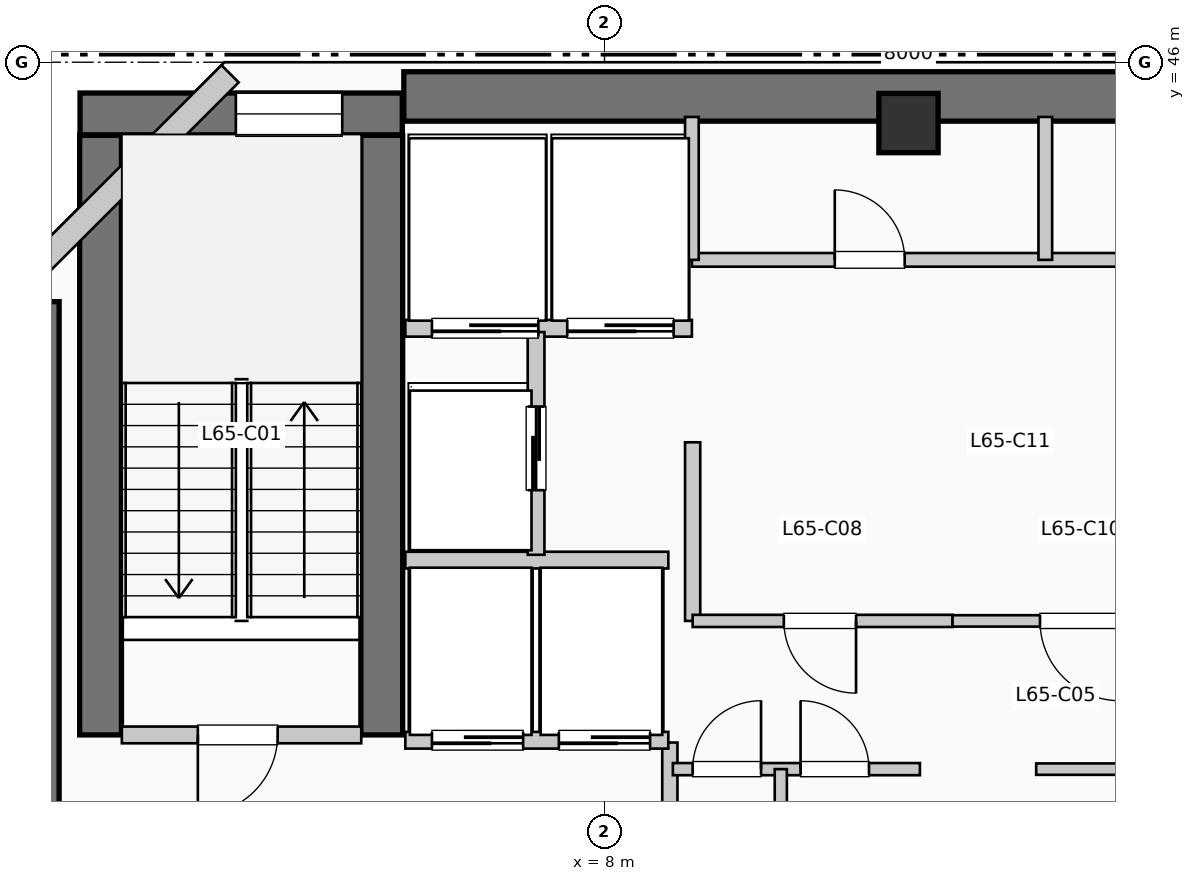
"""IFC4 building model, lengths in metres.
Left out: names, types, materials, properties, quantities, classifications, styles, units other than length and angle.
Written with IfcOpenShell. Run it as: python <this file> out.ifc"""

import sys

from ifc_helpers import new_model, si_unit, direction, frame, frame_2d, origin, origin_2d, place, context, subcontext, project, spatial, rectangle, extrude, element, fill, save


model = new_model("IFC4")
c1 = context("Model", 3, precision=1e-05, world=origin(), true_north=direction((0.0, 1.0)))
c2 = subcontext(c1, "Body", "Model", "MODEL_VIEW")
j1 = project(units=[si_unit("LENGTHUNIT", "METRE"), si_unit("PLANEANGLEUNIT", "RADIAN")], contexts=[c1])
p1 = place(None, origin())
s1 = spatial("IfcSite", under=j1, at=p1, CompositionType="ELEMENT")
p2 = place(p1, origin())
s2 = spatial("IfcBuilding", under=s1, at=p2, CompositionType="ELEMENT")
p3 = place(p2, frame((0.0, 0.0, 268.29)))
s3 = spatial("IfcBuildingStorey", under=s2, at=p3, CompositionType="ELEMENT", Elevation=268.29)
p4 = place(p3, frame((5.36, 45.55, 0.0), z_axis=(0.0, 0.0, 1.0), x_axis=(1.0, 0.0, 0.0)))
e1 = element("IfcWall", 1, at=p4, inside=s3, PredefinedType="SHEAR", context=c2, shape_type="SweptSolid", body=[
    extrude(rectangle(XDim=13.98, YDim=0.65, at=frame_2d((6.99, 0.0))), origin(), (0.0, 0.0, 1.0), 3.96),
])
p5 = place(p3, frame((0.5, 34.95, 0.0), z_axis=(0.0, 0.0, 1.0), x_axis=(0.0, 1.0, 0.0)))
e2 = element("IfcWall", 2, at=p5, inside=s3, PredefinedType="SHEAR", context=c2, shape_type="SweptSolid", body=[
    extrude(rectangle(XDim=7.9, YDim=0.65, at=frame_2d((3.95, 0.0))), origin(), (0.0, 0.0, 1.0), 3.96),
])
for number, where, z_axis, x_axis in (
    (3, (1.37, 37.15, 0.0), (0.0, 0.0, 1.0), (0.0, 1.0, 0.0)),
    (4, (5.07, 37.15, 0.0), (0.0, 0.0, 1.0), (0.0, 1.0, 0.0)),
):
    element("IfcWall", number, at=place(p3, frame(where, z_axis=z_axis, x_axis=x_axis)), inside=s3, PredefinedType="SHEAR", context=c2, shape_type="SweptSolid", body=[
        extrude(rectangle(XDim=7.89, YDim=0.55, at=frame_2d((3.945, 0.0))), origin(), (0.0, 0.0, 1.0), 3.96),
    ])
p6 = place(p3, frame((1.1, 45.32, 0.0), z_axis=(0.0, 0.0, 1.0), x_axis=(1.0, 0.0, 0.0)))
e5 = element("IfcWall", 5, at=p6, inside=s3, PredefinedType="SHEAR", context=c2, shape_type="SweptSolid", body=[
    extrude(rectangle(XDim=4.24, YDim=0.55, at=frame_2d((2.12, 0.0))), origin(), (0.0, 0.0, 1.0), 3.96),
])
p7 = place(p6, frame((2.05, 0.0, 1.05)))
e6 = element("IfcOpeningElement", 6, at=p7, cuts=e5, PredefinedType="OPENING", context=c2, shape_type="SweptSolid", body=[
    extrude(rectangle(XDim=1.4, YDim=1.8, at=frame_2d((0.7, 0.9))), frame((0.0, 0.285, 0.0), z_axis=(0.0, -1.0, 0.0), x_axis=(1.0, 0.0, 0.0)), (0.0, 0.0, 1.0), 0.57),
])
p8 = place(p3, frame((12.0, 45.2, 0.0), z_axis=(0.0, 0.0, 1.0), x_axis=(1.0, 0.0, 0.0)))
e7 = element("IfcColumn", 7, at=p8, inside=s3, PredefinedType="COLUMN", context=c2, shape_type="SweptSolid", body=[
    extrude(rectangle(XDim=0.78, YDim=0.78, at=origin_2d()), origin(), (0.0, 0.0, 1.0), 3.96),
])
p9 = place(p3, frame((3.074, 45.848, 0.0), z_axis=(0.0, 0.0, 1.0), x_axis=(-0.707106781187, -0.707106781187, 0.0)))
e8 = element("IfcWall", 8, at=p9, inside=s3, PredefinedType="SOLIDWALL", context=c2, shape_type="SweptSolid", body=[
    extrude(rectangle(XDim=4.133, YDim=0.32, at=frame_2d((2.066, 0.0))), origin(), (0.0, 0.0, 1.0), 3.74),
])
p10 = place(p3, frame((1.65, 37.15, 0.0), z_axis=(0.0, 0.0, 1.0), x_axis=(1.0, 0.0, 0.0)))
e9 = element("IfcWall", 9, at=p10, inside=s3, PredefinedType="PARTITIONING", context=c2, shape_type="SweptSolid", body=[
    extrude(rectangle(XDim=3.15, YDim=0.22, at=frame_2d((1.575, 0.0))), origin(), (0.0, 0.0, 1.0), 3.74),
])
p11 = place(p10, frame((2.05, 0.0, 0.0), z_axis=(0.0, 0.0, 1.0), x_axis=(-1.0, 0.0, 0.0)))
e10 = element("IfcOpeningElement", 10, at=p11, cuts=e9, PredefinedType="OPENING", context=c2, shape_type="SweptSolid", body=[
    extrude(rectangle(XDim=1.05, YDim=2.15, at=frame_2d((0.525, 1.075))), frame((0.0, 0.12, 0.0), z_axis=(0.0, -1.0, 0.0), x_axis=(1.0, 0.0, 0.0)), (0.0, 0.0, 1.0), 0.24),
])
p12 = place(p3, frame((8.86, 34.55, 0.0), z_axis=(0.0, 0.0, 1.0), x_axis=(0.0, 1.0, 0.0)))
e11 = element("IfcWall", 11, at=p12, inside=s3, PredefinedType="PARTITIONING", context=c2, shape_type="SweptSolid", body=[
    extrude(rectangle(XDim=2.5, YDim=0.2, at=frame_2d((1.25, 0.0))), origin(), (0.0, 0.0, 1.0), 3.74),
])
p13 = place(p3, frame((5.38, 37.08, 0.0), z_axis=(0.0, 0.0, 1.0), x_axis=(1.0, 0.0, 0.0)))
e12 = element("IfcWall", 12, at=p13, inside=s3, PredefinedType="PARTITIONING", context=c2, shape_type="SweptSolid", body=[
    extrude(rectangle(XDim=3.46, YDim=0.22, at=frame_2d((1.73, 0.0))), origin(), (0.0, 0.0, 1.0), 3.74),
])
p14 = place(p13, frame((1.55, 0.0, 0.0), z_axis=(0.0, 0.0, 1.0), x_axis=(-1.0, 0.0, 0.0)))
e13 = element("IfcOpeningElement", 13, at=p14, cuts=e12, PredefinedType="OPENING", context=c2, shape_type="SweptSolid", body=[
    extrude(rectangle(XDim=1.2, YDim=2.2, at=frame_2d((0.6, 1.1))), frame((0.0, 0.12, 0.0), z_axis=(0.0, -1.0, 0.0), x_axis=(1.0, 0.0, 0.0)), (0.0, 0.0, 1.0), 0.24),
])
p15 = place(p13, frame((3.22, 0.0, 0.0), z_axis=(0.0, 0.0, 1.0), x_axis=(-1.0, 0.0, 0.0)))
e14 = element("IfcOpeningElement", 14, at=p15, cuts=e12, PredefinedType="OPENING", context=c2, shape_type="SweptSolid", body=[
    extrude(rectangle(XDim=1.2, YDim=2.2, at=frame_2d((0.6, 1.1))), frame((0.0, 0.12, 0.0), z_axis=(0.0, -1.0, 0.0), x_axis=(1.0, 0.0, 0.0)), (0.0, 0.0, 1.0), 0.24),
])
p16 = place(p3, frame((5.38, 39.45, 0.0), z_axis=(0.0, 0.0, 1.0), x_axis=(1.0, 0.0, 0.0)))
e15 = element("IfcWall", 15, at=p16, inside=s3, PredefinedType="PARTITIONING", context=c2, shape_type="SweptSolid", body=[
    extrude(rectangle(XDim=3.46, YDim=0.22, at=frame_2d((1.73, 0.0))), origin(), (0.0, 0.0, 1.0), 3.74),
])
p17 = place(p3, frame((5.38, 42.5, 0.0), z_axis=(0.0, 0.0, 1.0), x_axis=(1.0, 0.0, 0.0)))
e16 = element("IfcWall", 16, at=p17, inside=s3, PredefinedType="PARTITIONING", context=c2, shape_type="SweptSolid", body=[
    extrude(rectangle(XDim=3.77, YDim=0.22, at=frame_2d((1.885, 0.0))), origin(), (0.0, 0.0, 1.0), 3.74),
])
p18 = place(p17, frame((1.75, 0.0, 0.0), z_axis=(0.0, 0.0, 1.0), x_axis=(-1.0, 0.0, 0.0)))
e17 = element("IfcOpeningElement", 17, at=p18, cuts=e16, PredefinedType="OPENING", context=c2, shape_type="SweptSolid", body=[
    extrude(rectangle(XDim=1.4, YDim=2.2, at=frame_2d((0.7, 1.1))), frame((0.0, 0.12, 0.0), z_axis=(0.0, -1.0, 0.0), x_axis=(1.0, 0.0, 0.0)), (0.0, 0.0, 1.0), 0.24),
])
p19 = place(p17, frame((3.53, 0.0, 0.0), z_axis=(0.0, 0.0, 1.0), x_axis=(-1.0, 0.0, 0.0)))
e18 = element("IfcOpeningElement", 18, at=p19, cuts=e16, PredefinedType="OPENING", context=c2, shape_type="SweptSolid", body=[
    extrude(rectangle(XDim=1.4, YDim=2.2, at=frame_2d((0.7, 1.1))), frame((0.0, 0.12, 0.0), z_axis=(0.0, -1.0, 0.0), x_axis=(1.0, 0.0, 0.0)), (0.0, 0.0, 1.0), 0.24),
])
p20 = place(p3, frame((7.1, 39.52, 0.0), z_axis=(0.0, 0.0, 1.0), x_axis=(0.0, 1.0, 0.0)))
e19 = element("IfcWall", 19, at=p20, inside=s3, PredefinedType="PARTITIONING", context=c2, shape_type="SweptSolid", body=[
    extrude(rectangle(XDim=2.93, YDim=0.22, at=frame_2d((1.465, 0.0))), origin(), (0.0, 0.0, 1.0), 3.74),
])
p21 = place(p20, frame((0.85, 0.0, 0.0)))
e20 = element("IfcOpeningElement", 20, at=p21, cuts=e19, PredefinedType="OPENING", context=c2, shape_type="SweptSolid", body=[
    extrude(rectangle(XDim=1.1, YDim=2.2, at=frame_2d((0.55, 1.1))), frame((0.0, 0.12, 0.0), z_axis=(0.0, -1.0, 0.0), x_axis=(1.0, 0.0, 0.0)), (0.0, 0.0, 1.0), 0.24),
])
p22 = place(p3, frame((9.16, 38.65, 0.0), z_axis=(0.0, 0.0, 1.0), x_axis=(0.0, 1.0, 0.0)))
e21 = element("IfcWall", 21, at=p22, inside=s3, PredefinedType="PARTITIONING", context=c2, shape_type="SweptSolid", body=[
    extrude(rectangle(XDim=2.35, YDim=0.2, at=frame_2d((1.175, 0.0))), origin(), (0.0, 0.0, 1.0), 3.74),
])
p23 = place(p3, frame((8.9, 36.7, 0.0), z_axis=(0.0, 0.0, 1.0), x_axis=(1.0, 0.0, 0.0)))
e22 = element("IfcWall", 22, at=p23, inside=s3, PredefinedType="PARTITIONING", context=c2, shape_type="SweptSolid", body=[
    extrude(rectangle(XDim=3.25, YDim=0.16, at=frame_2d((1.625, 0.0))), origin(), (0.0, 0.0, 1.0), 3.74),
])
p24 = place(p23, frame((0.26, 0.0, 0.0)))
e23 = element("IfcOpeningElement", 23, at=p24, cuts=e22, PredefinedType="OPENING", context=c2, shape_type="SweptSolid", body=[
    extrude(rectangle(XDim=0.9, YDim=2.15, at=frame_2d((0.45, 1.075))), frame((0.0, 0.09, 0.0), z_axis=(0.0, -1.0, 0.0), x_axis=(1.0, 0.0, 0.0)), (0.0, 0.0, 1.0), 0.18),
])
p25 = place(p23, frame((1.68, 0.0, 0.0)))
e24 = element("IfcOpeningElement", 24, at=p25, cuts=e22, PredefinedType="OPENING", context=c2, shape_type="SweptSolid", body=[
    extrude(rectangle(XDim=0.9, YDim=2.15, at=frame_2d((0.45, 1.075))), frame((0.0, 0.09, 0.0), z_axis=(0.0, -1.0, 0.0), x_axis=(1.0, 0.0, 0.0)), (0.0, 0.0, 1.0), 0.18),
])
p26 = place(p3, frame((10.32, 34.55, 0.0), z_axis=(0.0, 0.0, 1.0), x_axis=(0.0, 1.0, 0.0)))
e25 = element("IfcWall", 25, at=p26, inside=s3, PredefinedType="PARTITIONING", context=c2, shape_type="SweptSolid", body=[
    extrude(rectangle(XDim=2.15, YDim=0.16, at=frame_2d((1.075, 0.0))), origin(), (0.0, 0.0, 1.0), 3.74),
])
p27 = place(p3, frame((9.16, 38.65, 0.0), z_axis=(0.0, 0.0, 1.0), x_axis=(1.0, 0.0, 0.0)))
e26 = element("IfcWall", 26, at=p27, inside=s3, PredefinedType="PARTITIONING", context=c2, shape_type="SweptSolid", body=[
    extrude(rectangle(XDim=3.42, YDim=0.16, at=frame_2d((1.71, 0.0))), origin(), (0.0, 0.0, 1.0), 3.74),
])
p28 = place(p27, frame((2.15, 0.0, 0.0), z_axis=(0.0, 0.0, 1.0), x_axis=(-1.0, 0.0, 0.0)))
e27 = element("IfcOpeningElement", 27, at=p28, cuts=e26, PredefinedType="OPENING", context=c2, shape_type="SweptSolid", body=[
    extrude(rectangle(XDim=0.95, YDim=2.15, at=frame_2d((0.475, 1.075))), frame((0.0, 0.09, 0.0), z_axis=(0.0, -1.0, 0.0), x_axis=(1.0, 0.0, 0.0)), (0.0, 0.0, 1.0), 0.18),
])
p29 = place(p3, frame((13.68, 36.7, 0.0), z_axis=(0.0, 0.0, 1.0), x_axis=(1.0, 0.0, 0.0)))
e28 = element("IfcWall", 28, at=p29, inside=s3, PredefinedType="PARTITIONING", context=c2, shape_type="SweptSolid", body=[
    extrude(rectangle(XDim=3.28, YDim=0.15, at=frame_2d((1.64, 0.0))), origin(), (0.0, 0.0, 1.0), 3.74),
])
p30 = place(p29, frame((1.15, 0.0, 0.0)))
e29 = element("IfcOpeningElement", 29, at=p30, cuts=e28, PredefinedType="OPENING", context=c2, shape_type="SweptSolid", body=[
    extrude(rectangle(XDim=0.95, YDim=2.15, at=frame_2d((0.475, 1.075))), frame((0.0, 0.085, 0.0), z_axis=(0.0, -1.0, 0.0), x_axis=(1.0, 0.0, 0.0)), (0.0, 0.0, 1.0), 0.17),
])
p31 = place(p3, frame((12.58, 38.65, 0.0), z_axis=(0.0, 0.0, 1.0), x_axis=(1.0, 0.0, 0.0)))
e30 = element("IfcWall", 30, at=p31, inside=s3, PredefinedType="PARTITIONING", context=c2, shape_type="SweptSolid", body=[
    extrude(rectangle(XDim=3.38, YDim=0.15, at=frame_2d((1.69, 0.0))), origin(), (0.0, 0.0, 1.0), 3.74),
])
p32 = place(p31, frame((2.2, 0.0, 0.0), z_axis=(0.0, 0.0, 1.0), x_axis=(-1.0, 0.0, 0.0)))
e31 = element("IfcOpeningElement", 31, at=p32, cuts=e30, PredefinedType="OPENING", context=c2, shape_type="SweptSolid", body=[
    extrude(rectangle(XDim=1.05, YDim=2.15, at=frame_2d((0.525, 1.075))), frame((0.0, 0.085, 0.0), z_axis=(0.0, -1.0, 0.0), x_axis=(1.0, 0.0, 0.0)), (0.0, 0.0, 1.0), 0.17),
])
p33 = place(p3, frame((9.15, 43.4, 0.0), z_axis=(0.0, 0.0, 1.0), x_axis=(1.0, 0.0, 0.0)))
e32 = element("IfcWall", 32, at=p33, inside=s3, PredefinedType="PLUMBINGWALL", context=c2, shape_type="SweptSolid", body=[
    extrude(rectangle(XDim=9.33, YDim=0.18, at=frame_2d((4.665, 0.0))), origin(), (0.0, 0.0, 1.0), 3.74),
])
p34 = place(p33, frame((1.88, 0.0, 0.0)))
e33 = element("IfcOpeningElement", 33, at=p34, cuts=e32, PredefinedType="OPENING", context=c2, shape_type="SweptSolid", body=[
    extrude(rectangle(XDim=0.92, YDim=2.1, at=frame_2d((0.46, 1.05))), frame((0.0, 0.1, 0.0), z_axis=(0.0, -1.0, 0.0), x_axis=(1.0, 0.0, 0.0)), (0.0, 0.0, 1.0), 0.2),
])
p35 = place(p33, frame((6.515, 0.0, 0.0)))
e34 = element("IfcOpeningElement", 34, at=p35, cuts=e32, PredefinedType="OPENING", context=c2, shape_type="SweptSolid", body=[
    extrude(rectangle(XDim=0.92, YDim=2.1, at=frame_2d((0.46, 1.05))), frame((0.0, 0.1, 0.0), z_axis=(0.0, -1.0, 0.0), x_axis=(1.0, 0.0, 0.0)), (0.0, 0.0, 1.0), 0.2),
])
for number, where, z_axis, x_axis in (
    (35, (9.15, 43.4, 0.0), (0.0, 0.0, 1.0), (0.0, 1.0, 0.0)),
    (36, (13.8, 43.4, 0.0), (0.0, 0.0, 1.0), (0.0, 1.0, 0.0)),
):
    element("IfcWall", number, at=place(p3, frame(where, z_axis=z_axis, x_axis=x_axis)), inside=s3, PredefinedType="PLUMBINGWALL", context=c2, shape_type="SweptSolid", body=[
        extrude(rectangle(XDim=1.88, YDim=0.18, at=frame_2d((0.94, 0.0))), origin(), (0.0, 0.0, 1.0), 3.74),
    ])
p36 = place(p7, origin())
e37 = element("IfcWindow", 37, at=p36, inside=s3, PartitioningType="SINGLE_PANEL", PredefinedType="WINDOW", context=c2, shape_type="SweptSolid", body=[
    extrude(rectangle(XDim=1.4, YDim=1.8, at=frame_2d((0.7, 0.9))), frame((0.0, 0.03, 0.0), z_axis=(0.0, -1.0, 0.0), x_axis=(1.0, 0.0, 0.0)), (0.0, 0.0, 1.0), 0.06),
])
fill(e6, e37)
p37 = place(p11, origin())
e38 = element("IfcDoor", 38, at=p37, inside=s3, OperationType="SINGLE_SWING_LEFT", PredefinedType="DOOR", context=c2, shape_type="SweptSolid", body=[
    extrude(rectangle(XDim=1.05, YDim=2.15, at=frame_2d((0.525, 1.075))), frame((0.0, 0.025, 0.0), z_axis=(0.0, -1.0, 0.0), x_axis=(1.0, 0.0, 0.0)), (0.0, 0.0, 1.0), 0.05),
])
fill(e10, e38)
p38 = place(p14, origin())
e39 = element("IfcDoor", 39, at=p38, inside=s3, OperationType="SLIDING_TO_RIGHT", PredefinedType="DOOR", context=c2, shape_type="SweptSolid", body=[
    extrude(rectangle(XDim=1.2, YDim=2.2, at=frame_2d((0.6, 1.1))), frame((0.0, 0.025, 0.0), z_axis=(0.0, -1.0, 0.0), x_axis=(1.0, 0.0, 0.0)), (0.0, 0.0, 1.0), 0.05),
])
fill(e13, e39)
p39 = place(p15, origin())
e40 = element("IfcDoor", 40, at=p39, inside=s3, OperationType="SLIDING_TO_RIGHT", PredefinedType="DOOR", context=c2, shape_type="SweptSolid", body=[
    extrude(rectangle(XDim=1.2, YDim=2.2, at=frame_2d((0.6, 1.1))), frame((0.0, 0.025, 0.0), z_axis=(0.0, -1.0, 0.0), x_axis=(1.0, 0.0, 0.0)), (0.0, 0.0, 1.0), 0.05),
])
fill(e14, e40)
p40 = place(p18, origin())
e41 = element("IfcDoor", 41, at=p40, inside=s3, OperationType="SLIDING_TO_LEFT", PredefinedType="DOOR", context=c2, shape_type="SweptSolid", body=[
    extrude(rectangle(XDim=1.4, YDim=2.2, at=frame_2d((0.7, 1.1))), frame((0.0, 0.025, 0.0), z_axis=(0.0, -1.0, 0.0), x_axis=(1.0, 0.0, 0.0)), (0.0, 0.0, 1.0), 0.05),
])
fill(e17, e41)
p41 = place(p19, origin())
e42 = element("IfcDoor", 42, at=p41, inside=s3, OperationType="SLIDING_TO_LEFT", PredefinedType="DOOR", context=c2, shape_type="SweptSolid", body=[
    extrude(rectangle(XDim=1.4, YDim=2.2, at=frame_2d((0.7, 1.1))), frame((0.0, 0.025, 0.0), z_axis=(0.0, -1.0, 0.0), x_axis=(1.0, 0.0, 0.0)), (0.0, 0.0, 1.0), 0.05),
])
fill(e18, e42)
p42 = place(p21, origin())
e43 = element("IfcDoor", 43, at=p42, inside=s3, OperationType="SLIDING_TO_LEFT", PredefinedType="DOOR", context=c2, shape_type="SweptSolid", body=[
    extrude(rectangle(XDim=1.1, YDim=2.2, at=frame_2d((0.55, 1.1))), frame((0.0, 0.025, 0.0), z_axis=(0.0, -1.0, 0.0), x_axis=(1.0, 0.0, 0.0)), (0.0, 0.0, 1.0), 0.05),
])
fill(e20, e43)
p43 = place(p24, origin())
e44 = element("IfcDoor", 44, at=p43, inside=s3, OperationType="SINGLE_SWING_RIGHT", PredefinedType="DOOR", context=c2, shape_type="SweptSolid", body=[
    extrude(rectangle(XDim=0.9, YDim=2.15, at=frame_2d((0.45, 1.075))), frame((0.0, 0.025, 0.0), z_axis=(0.0, -1.0, 0.0), x_axis=(1.0, 0.0, 0.0)), (0.0, 0.0, 1.0), 0.05),
])
fill(e23, e44)
p44 = place(p25, origin())
e45 = element("IfcDoor", 45, at=p44, inside=s3, OperationType="SINGLE_SWING_LEFT", PredefinedType="DOOR", context=c2, shape_type="SweptSolid", body=[
    extrude(rectangle(XDim=0.9, YDim=2.15, at=frame_2d((0.45, 1.075))), frame((0.0, 0.025, 0.0), z_axis=(0.0, -1.0, 0.0), x_axis=(1.0, 0.0, 0.0)), (0.0, 0.0, 1.0), 0.05),
])
fill(e24, e45)
p45 = place(p28, origin())
e46 = element("IfcDoor", 46, at=p45, inside=s3, OperationType="SINGLE_SWING_RIGHT", PredefinedType="DOOR", context=c2, shape_type="SweptSolid", body=[
    extrude(rectangle(XDim=0.95, YDim=2.15, at=frame_2d((0.475, 1.075))), frame((0.0, 0.025, 0.0), z_axis=(0.0, -1.0, 0.0), x_axis=(1.0, 0.0, 0.0)), (0.0, 0.0, 1.0), 0.05),
])
fill(e27, e46)
p46 = place(p32, origin())
e47 = element("IfcDoor", 47, at=p46, inside=s3, OperationType="SINGLE_SWING_RIGHT", PredefinedType="DOOR", context=c2, shape_type="SweptSolid", body=[
    extrude(rectangle(XDim=1.05, YDim=2.15, at=frame_2d((0.525, 1.075))), frame((0.0, 0.025, 0.0), z_axis=(0.0, -1.0, 0.0), x_axis=(1.0, 0.0, 0.0)), (0.0, 0.0, 1.0), 0.05),
])
fill(e31, e47)
p47 = place(p34, origin())
e48 = element("IfcDoor", 48, at=p47, inside=s3, OperationType="SINGLE_SWING_LEFT", PredefinedType="DOOR", context=c2, shape_type="SweptSolid", body=[
    extrude(rectangle(XDim=0.92, YDim=2.1, at=frame_2d((0.46, 1.05))), frame((0.0, 0.025, 0.0), z_axis=(0.0, -1.0, 0.0), x_axis=(1.0, 0.0, 0.0)), (0.0, 0.0, 1.0), 0.05),
])
fill(e33, e48)
save(model, sys.argv[1])
